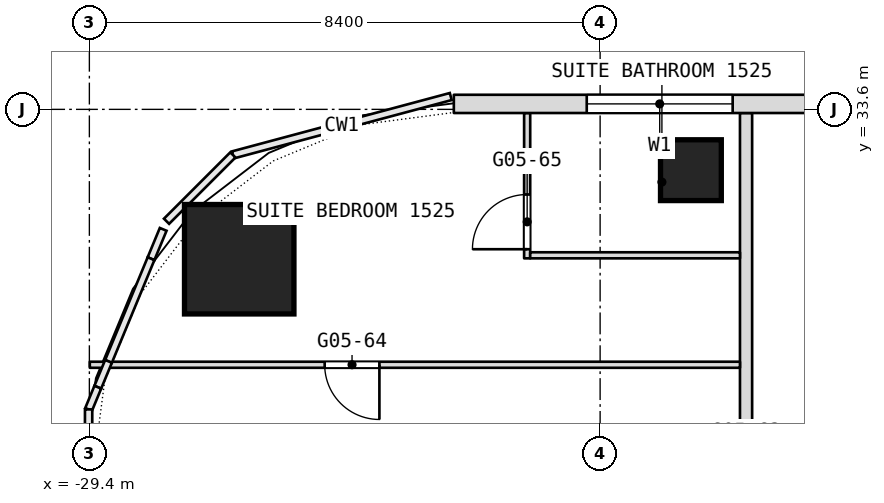
"""IFC4 building model, lengths in metres.
Left out: names, types, materials, properties, quantities, classifications, styles, units other than length and angle.
Written with IfcOpenShell. Run it as: python <this file> out.ifc"""

import sys

from ifc_helpers import new_model, si_unit, direction, frame, frame_2d, origin, origin_2d, place, context, subcontext, project, spatial, rectangle, extrude, element, fill, save


model = new_model("IFC4")
c1 = context("Model", 3, precision=1e-05, world=origin(), true_north=direction((0.0, 1.0)))
c2 = subcontext(c1, "Body", "Model", "MODEL_VIEW")
j1 = project(units=[si_unit("LENGTHUNIT", "METRE"), si_unit("PLANEANGLEUNIT", "RADIAN")], contexts=[c1])
p1 = place(None, origin())
s1 = spatial("IfcSite", under=j1, at=p1, CompositionType="ELEMENT")
p2 = place(p1, origin())
s2 = spatial("IfcBuilding", under=s1, at=p2, CompositionType="ELEMENT")
p3 = place(p2, frame((0.0, 0.0, 68.9)))
s3 = spatial("IfcBuildingStorey", under=s2, at=p3, CompositionType="ELEMENT", Elevation=68.9)
p4 = place(p3, frame((-26.936, 31.135, 0.0), z_axis=(0.0, 0.0, 1.0), x_axis=(1.0, 0.0, 0.0)))
e1 = element("IfcColumn", 1, at=p4, inside=s3, PredefinedType="COLUMN", context=c2, shape_type="SweptSolid", body=[
    extrude(rectangle(XDim=1.8, YDim=1.8, at=origin_2d()), origin(), (0.0, 0.0, 1.0), 3.6),
])
p5 = place(p3, frame((-19.507, 32.6, 0.0), z_axis=(0.0, 0.0, 1.0), x_axis=(1.0, 0.0, 0.0)))
e2 = element("IfcColumn", 2, at=p5, inside=s3, PredefinedType="COLUMN", context=c2, shape_type="SweptSolid", body=[
    extrude(rectangle(XDim=1.0, YDim=1.0, at=origin_2d()), origin(), (0.0, 0.0, 1.0), 3.6),
])
p6 = place(p3, frame((-18.6, 18.5, 0.0), z_axis=(0.0, 0.0, 1.0), x_axis=(0.0, 1.0, 0.0)))
e3 = element("IfcWall", 3, at=p6, inside=s3, PredefinedType="PARTITIONING", context=c2, shape_type="SweptSolid", body=[
    extrude(rectangle(XDim=15.04, YDim=0.2, at=frame_2d((7.52, 0.0))), origin(), (0.0, 0.0, 1.0), 3.34),
])
p7 = place(p6, frame((2.0, 0.0, 0.0)))
e4 = element("IfcOpeningElement", 4, at=p7, cuts=e3, PredefinedType="OPENING", context=c2, shape_type="SweptSolid", body=[
    extrude(rectangle(XDim=1.1, YDim=2.1, at=frame_2d((0.55, 1.05))), frame((0.0, 0.1, 0.0), z_axis=(0.0, -1.0, 0.0), x_axis=(1.0, 0.0, 0.0)), (0.0, 0.0, 1.0), 0.2),
])
p8 = place(p6, frame((8.25, 0.0, 0.0)))
e5 = element("IfcOpeningElement", 5, at=p8, cuts=e3, PredefinedType="OPENING", context=c2, shape_type="SweptSolid", body=[
    extrude(rectangle(XDim=1.1, YDim=2.1, at=frame_2d((0.55, 1.05))), frame((0.0, 0.1, 0.0), z_axis=(0.0, -1.0, 0.0), x_axis=(1.0, 0.0, 0.0)), (0.0, 0.0, 1.0), 0.2),
])
p9 = place(p3, frame((-22.2, 31.15, 0.0), z_axis=(0.0, 0.0, 1.0), x_axis=(0.0, 1.0, 0.0)))
e6 = element("IfcWall", 6, at=p9, inside=s3, PredefinedType="PARTITIONING", context=c2, shape_type="SweptSolid", body=[
    extrude(rectangle(XDim=2.39, YDim=0.1, at=frame_2d((1.195, 0.0))), origin(), (0.0, 0.0, 1.0), 3.34),
])
p10 = place(p9, frame((0.15, 0.0, 0.0)))
e7 = element("IfcOpeningElement", 7, at=p10, cuts=e6, PredefinedType="OPENING", context=c2, shape_type="SweptSolid", body=[
    extrude(rectangle(XDim=0.9, YDim=2.1, at=frame_2d((0.45, 1.05))), frame((0.0, 0.05, 0.0), z_axis=(0.0, -1.0, 0.0), x_axis=(1.0, 0.0, 0.0)), (0.0, 0.0, 1.0), 0.1),
])
p11 = place(p3, frame((-29.393, 29.4, 0.0), z_axis=(0.0, 0.0, 1.0), x_axis=(1.0, 0.0, 0.0)))
e8 = element("IfcWall", 8, at=p11, inside=s3, PredefinedType="PARTITIONING", context=c2, shape_type="SweptSolid", body=[
    extrude(rectangle(XDim=10.693, YDim=0.1, at=frame_2d((5.347, 0.0))), origin(), (0.0, 0.0, 1.0), 3.34),
])
p12 = place(p11, frame((3.863, 0.0, 0.0)))
e9 = element("IfcOpeningElement", 9, at=p12, cuts=e8, PredefinedType="OPENING", context=c2, shape_type="SweptSolid", body=[
    extrude(rectangle(XDim=0.9, YDim=2.1, at=frame_2d((0.45, 1.05))), frame((0.0, 0.05, 0.0), z_axis=(0.0, -1.0, 0.0), x_axis=(1.0, 0.0, 0.0)), (0.0, 0.0, 1.0), 0.1),
])
p13 = place(p3, frame((-22.15, 31.2, 0.0), z_axis=(0.0, 0.0, 1.0), x_axis=(1.0, 0.0, 0.0)))
e10 = element("IfcWall", 10, at=p13, inside=s3, PredefinedType="PARTITIONING", context=c2, shape_type="SweptSolid", body=[
    extrude(rectangle(XDim=3.45, YDim=0.1, at=frame_2d((1.725, 0.0))), origin(), (0.0, 0.0, 1.0), 3.34),
])
p14 = place(p3, frame((23.406, 33.69, 0.0), z_axis=(0.0, 0.0, 1.0), x_axis=(-1.0, 0.0, 0.0)))
e11 = element("IfcWall", 11, at=p14, inside=s3, PredefinedType="NOTDEFINED", context=c2, shape_type="SweptSolid", body=[
    extrude(rectangle(XDim=46.812, YDim=0.3, at=frame_2d((23.406, 0.0))), origin(), (0.0, 0.0, 1.0), 3.6),
])
p15 = place(p14, frame((2.186, 0.0, 0.9)))
e12 = element("IfcOpeningElement", 12, at=p15, cuts=e11, PredefinedType="OPENING", context=c2, shape_type="SweptSolid", body=[
    extrude(rectangle(XDim=2.4, YDim=2.1, at=frame_2d((1.2, 1.05))), frame((0.0, 0.15, 0.0), z_axis=(0.0, -1.0, 0.0), x_axis=(1.0, 0.0, 0.0)), (0.0, 0.0, 1.0), 0.3),
])
p16 = place(p14, frame((7.506, 0.0, 0.9)))
e13 = element("IfcOpeningElement", 13, at=p16, cuts=e11, PredefinedType="OPENING", context=c2, shape_type="SweptSolid", body=[
    extrude(rectangle(XDim=2.4, YDim=2.1, at=frame_2d((1.2, 1.05))), frame((0.0, 0.15, 0.0), z_axis=(0.0, -1.0, 0.0), x_axis=(1.0, 0.0, 0.0)), (0.0, 0.0, 1.0), 0.3),
])
p17 = place(p14, frame((11.706, 0.0, 0.9)))
e14 = element("IfcOpeningElement", 14, at=p17, cuts=e11, PredefinedType="OPENING", context=c2, shape_type="SweptSolid", body=[
    extrude(rectangle(XDim=2.4, YDim=2.1, at=frame_2d((1.2, 1.05))), frame((0.0, 0.15, 0.0), z_axis=(0.0, -1.0, 0.0), x_axis=(1.0, 0.0, 0.0)), (0.0, 0.0, 1.0), 0.3),
])
p18 = place(p14, frame((15.906, 0.0, 0.9)))
e15 = element("IfcOpeningElement", 15, at=p18, cuts=e11, PredefinedType="OPENING", context=c2, shape_type="SweptSolid", body=[
    extrude(rectangle(XDim=2.4, YDim=2.1, at=frame_2d((1.2, 1.05))), frame((0.0, 0.15, 0.0), z_axis=(0.0, -1.0, 0.0), x_axis=(1.0, 0.0, 0.0)), (0.0, 0.0, 1.0), 0.3),
])
p19 = place(p14, frame((20.106, 0.0, 0.9)))
e16 = element("IfcOpeningElement", 16, at=p19, cuts=e11, PredefinedType="OPENING", context=c2, shape_type="SweptSolid", body=[
    extrude(rectangle(XDim=2.4, YDim=2.1, at=frame_2d((1.2, 1.05))), frame((0.0, 0.15, 0.0), z_axis=(0.0, -1.0, 0.0), x_axis=(1.0, 0.0, 0.0)), (0.0, 0.0, 1.0), 0.3),
])
p20 = place(p14, frame((24.306, 0.0, 0.9)))
e17 = element("IfcOpeningElement", 17, at=p20, cuts=e11, PredefinedType="OPENING", context=c2, shape_type="SweptSolid", body=[
    extrude(rectangle(XDim=2.4, YDim=2.1, at=frame_2d((1.2, 1.05))), frame((0.0, 0.15, 0.0), z_axis=(0.0, -1.0, 0.0), x_axis=(1.0, 0.0, 0.0)), (0.0, 0.0, 1.0), 0.3),
])
p21 = place(p14, frame((28.506, 0.0, 0.9)))
e18 = element("IfcOpeningElement", 18, at=p21, cuts=e11, PredefinedType="OPENING", context=c2, shape_type="SweptSolid", body=[
    extrude(rectangle(XDim=2.4, YDim=2.1, at=frame_2d((1.2, 1.05))), frame((0.0, 0.15, 0.0), z_axis=(0.0, -1.0, 0.0), x_axis=(1.0, 0.0, 0.0)), (0.0, 0.0, 1.0), 0.3),
])
p22 = place(p14, frame((32.706, 0.0, 0.9)))
e19 = element("IfcOpeningElement", 19, at=p22, cuts=e11, PredefinedType="OPENING", context=c2, shape_type="SweptSolid", body=[
    extrude(rectangle(XDim=2.4, YDim=2.1, at=frame_2d((1.2, 1.05))), frame((0.0, 0.15, 0.0), z_axis=(0.0, -1.0, 0.0), x_axis=(1.0, 0.0, 0.0)), (0.0, 0.0, 1.0), 0.3),
])
p23 = place(p14, frame((36.906, 0.0, 0.9)))
e20 = element("IfcOpeningElement", 20, at=p23, cuts=e11, PredefinedType="OPENING", context=c2, shape_type="SweptSolid", body=[
    extrude(rectangle(XDim=2.4, YDim=2.1, at=frame_2d((1.2, 1.05))), frame((0.0, 0.15, 0.0), z_axis=(0.0, -1.0, 0.0), x_axis=(1.0, 0.0, 0.0)), (0.0, 0.0, 1.0), 0.3),
])
p24 = place(p14, frame((42.226, 0.0, 0.9)))
e21 = element("IfcOpeningElement", 21, at=p24, cuts=e11, PredefinedType="OPENING", context=c2, shape_type="SweptSolid", body=[
    extrude(rectangle(XDim=2.4, YDim=2.1, at=frame_2d((1.2, 1.05))), frame((0.0, 0.15, 0.0), z_axis=(0.0, -1.0, 0.0), x_axis=(1.0, 0.0, 0.0)), (0.0, 0.0, 1.0), 0.3),
])
p25 = place(p10, origin())
e22 = element("IfcDoor", 22, at=p25, inside=s3, OperationType="SINGLE_SWING_RIGHT", PredefinedType="DOOR", context=c2, shape_type="SweptSolid", body=[
    extrude(rectangle(XDim=0.9, YDim=2.1, at=frame_2d((0.45, 1.05))), frame((0.0, 0.025, 0.0), z_axis=(0.0, -1.0, 0.0), x_axis=(1.0, 0.0, 0.0)), (0.0, 0.0, 1.0), 0.05),
])
fill(e7, e22)
p26 = place(p12, origin())
e23 = element("IfcDoor", 23, at=p26, inside=s3, OperationType="SINGLE_SWING_LEFT", PredefinedType="DOOR", context=c2, shape_type="SweptSolid", body=[
    extrude(rectangle(XDim=0.9, YDim=2.1, at=frame_2d((0.45, 1.05))), frame((0.0, 0.025, 0.0), z_axis=(0.0, -1.0, 0.0), x_axis=(1.0, 0.0, 0.0)), (0.0, 0.0, 1.0), 0.05),
])
fill(e9, e23)
p27 = place(p24, origin())
e24 = element("IfcWindow", 24, at=p27, inside=s3, PartitioningType="SINGLE_PANEL", PredefinedType="WINDOW", context=c2, shape_type="SweptSolid", body=[
    extrude(rectangle(XDim=2.4, YDim=2.1, at=frame_2d((1.2, 1.05))), frame((0.0, 0.03, 0.0), z_axis=(0.0, -1.0, 0.0), x_axis=(1.0, 0.0, 0.0)), (0.0, 0.0, 1.0), 0.06),
])
fill(e21, e24)
save(model, sys.argv[1])
